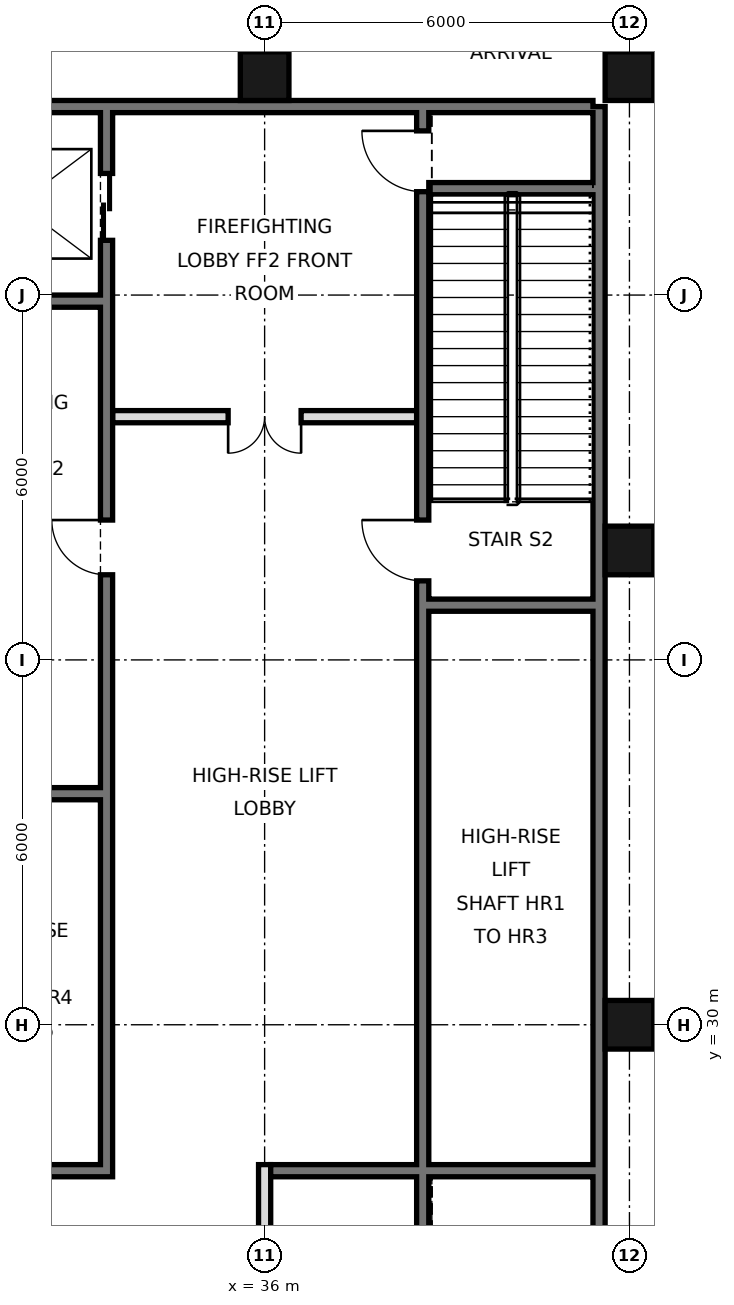
"""IFC4 building model, lengths in metres.
Left out: names, types, materials, properties, quantities, classifications, styles, units other than length and angle.
Written with IfcOpenShell. Run it as: python <this file> out.ifc"""

import sys

from ifc_helpers import new_model, si_unit, direction, frame, frame_2d, origin, origin_2d, place, context, subcontext, project, spatial, rectangle, hollow_rectangle, extrude, element, fill, save


model = new_model("IFC4")
c1 = context("Model", 3, precision=1e-05, world=origin(), true_north=direction((0.0, 1.0)))
c2 = subcontext(c1, "Body", "Model", "MODEL_VIEW")
j1 = project(units=[si_unit("LENGTHUNIT", "METRE"), si_unit("PLANEANGLEUNIT", "RADIAN")], contexts=[c1])
p1 = place(None, origin())
s1 = spatial("IfcSite", under=j1, at=p1, CompositionType="ELEMENT")
p2 = place(p1, origin())
s2 = spatial("IfcBuilding", under=s1, at=p2, CompositionType="ELEMENT")
p3 = place(p2, frame((0.0, 0.0, 331.2)))
s3 = spatial("IfcBuildingStorey", under=s2, at=p3, CompositionType="ELEMENT", Elevation=331.2)
for number, where, z_axis, x_axis in (
    (1, (36.0, 45.6, 0.0), (0.0, 0.0, 1.0), (1.0, 0.0, 0.0)),
    (2, (42.0, 30.0, 0.0), (0.0, 0.0, 1.0), (1.0, 0.0, 0.0)),
    (3, (42.0, 37.8, 0.0), (0.0, 0.0, 1.0), (1.0, 0.0, 0.0)),
    (4, (42.0, 45.6, 0.0), (0.0, 0.0, 1.0), (1.0, 0.0, 0.0)),
):
    element("IfcColumn", number, at=place(p3, frame(where, z_axis=z_axis, x_axis=x_axis)), inside=s3, PredefinedType="COLUMN", context=c2, shape_type="SweptSolid", body=[
        extrude(hollow_rectangle(XDim=0.8, YDim=0.8, WallThickness=0.025, at=origin_2d()), origin(), (0.0, 0.0, 1.0), 6.6),
    ])
p4 = place(p3, frame((41.5, 21.6, 0.0), z_axis=(0.0, 0.0, 1.0), x_axis=(0.0, 1.0, 0.0)))
e5 = element("IfcWall", 5, at=p4, inside=s3, PredefinedType="SOLIDWALL", context=c2, shape_type="SweptSolid", body=[
    extrude(rectangle(XDim=23.5, YDim=0.2, at=frame_2d((11.75, 0.0))), origin(), (0.0, 0.0, 1.0), 6.35),
])
p5 = place(p3, frame((6.6, 45.1, 0.0), z_axis=(0.0, 0.0, 1.0), x_axis=(1.0, 0.0, 0.0)))
e6 = element("IfcWall", 6, at=p5, inside=s3, PredefinedType="SOLIDWALL", context=c2, shape_type="SweptSolid", body=[
    extrude(rectangle(XDim=34.8, YDim=0.2, at=frame_2d((17.4, 0.0))), origin(), (0.0, 0.0, 1.0), 6.35),
])
p6 = place(p3, frame((33.4, 27.5, 0.0), z_axis=(0.0, 0.0, 1.0), x_axis=(0.0, 1.0, 0.0)))
e7 = element("IfcWall", 7, at=p6, inside=s3, PredefinedType="SOLIDWALL", context=c2, shape_type="SweptSolid", body=[
    extrude(rectangle(XDim=17.5, YDim=0.2, at=frame_2d((8.75, 0.0))), origin(), (0.0, 0.0, 1.0), 6.35),
])
p7 = place(p6, frame((15.4, 0.0, 0.0)))
e8 = element("IfcOpeningElement", 8, at=p7, cuts=e7, PredefinedType="OPENING", context=c2, shape_type="SweptSolid", body=[
    extrude(rectangle(XDim=1.1, YDim=2.1, at=frame_2d((0.55, 1.05))), frame((0.0, 0.11, 0.0), z_axis=(0.0, -1.0, 0.0), x_axis=(1.0, 0.0, 0.0)), (0.0, 0.0, 1.0), 0.22),
])
p8 = place(p6, frame((9.9, 0.0, 0.0)))
e9 = element("IfcOpeningElement", 9, at=p8, cuts=e7, PredefinedType="OPENING", context=c2, shape_type="SweptSolid", body=[
    extrude(rectangle(XDim=0.9, YDim=2.1, at=frame_2d((0.45, 1.05))), frame((0.0, 0.11, 0.0), z_axis=(0.0, -1.0, 0.0), x_axis=(1.0, 0.0, 0.0)), (0.0, 0.0, 1.0), 0.22),
])
p9 = place(p3, frame((36.0, 21.6, 0.0), z_axis=(0.0, 0.0, 1.0), x_axis=(0.0, 1.0, 0.0)))
e10 = element("IfcWall", 10, at=p9, inside=s3, PredefinedType="PARTITIONING", context=c2, shape_type="SweptSolid", body=[
    extrude(rectangle(XDim=6.1, YDim=0.2, at=frame_2d((3.05, 0.0))), origin(), (0.0, 0.0, 1.0), 6.35),
])
p10 = place(p3, frame((38.6, 21.6, 0.0), z_axis=(0.0, 0.0, 1.0), x_axis=(0.0, 1.0, 0.0)))
e11 = element("IfcWall", 11, at=p10, inside=s3, PredefinedType="SOLIDWALL", context=c2, shape_type="SweptSolid", body=[
    extrude(rectangle(XDim=23.4, YDim=0.2, at=frame_2d((11.7, 0.0))), origin(), (0.0, 0.0, 1.0), 6.35),
])
p11 = place(p10, frame((22.1, 0.0, 0.0)))
e12 = element("IfcOpeningElement", 12, at=p11, cuts=e11, PredefinedType="OPENING", context=c2, shape_type="SweptSolid", body=[
    extrude(rectangle(XDim=1.0, YDim=2.1, at=frame_2d((0.5, 1.05))), frame((0.0, 0.11, 0.0), z_axis=(0.0, -1.0, 0.0), x_axis=(1.0, 0.0, 0.0)), (0.0, 0.0, 1.0), 0.22),
])
p12 = place(p10, frame((15.7, 0.0, 0.0)))
e13 = element("IfcOpeningElement", 13, at=p12, cuts=e11, PredefinedType="OPENING", context=c2, shape_type="SweptSolid", body=[
    extrude(rectangle(XDim=1.0, YDim=2.1, at=frame_2d((0.5, 1.05))), frame((0.0, 0.11, 0.0), z_axis=(0.0, -1.0, 0.0), x_axis=(1.0, 0.0, 0.0)), (0.0, 0.0, 1.0), 0.22),
])
p13 = place(p10, frame((0.175, 0.0, 0.0)))
e14 = element("IfcOpeningElement", 14, at=p13, cuts=e11, PredefinedType="OPENING", context=c2, shape_type="SweptSolid", body=[
    extrude(rectangle(XDim=0.9, YDim=2.1, at=frame_2d((0.45, 1.05))), frame((0.0, 0.11, 0.0), z_axis=(0.0, -1.0, 0.0), x_axis=(1.0, 0.0, 0.0)), (0.0, 0.0, 1.0), 0.22),
])
p14 = place(p3, frame((30.6, 27.6, 0.0), z_axis=(0.0, 0.0, 1.0), x_axis=(1.0, 0.0, 0.0)))
e15 = element("IfcWall", 15, at=p14, inside=s3, PredefinedType="SOLIDWALL", context=c2, shape_type="SweptSolid", body=[
    extrude(rectangle(XDim=2.7, YDim=0.2, at=frame_2d((1.35, 0.0))), origin(), (0.0, 0.0, 1.0), 6.35),
])
p15 = place(p3, frame((36.1, 27.6, 0.0), z_axis=(0.0, 0.0, 1.0), x_axis=(1.0, 0.0, 0.0)))
e16 = element("IfcWall", 16, at=p15, inside=s3, PredefinedType="SOLIDWALL", context=c2, shape_type="SweptSolid", body=[
    extrude(rectangle(XDim=5.3, YDim=0.2, at=frame_2d((2.65, 0.0))), origin(), (0.0, 0.0, 1.0), 6.35),
])
for number, where, z_axis, x_axis in (
    (17, (30.6, 33.8, 0.0), (0.0, 0.0, 1.0), (1.0, 0.0, 0.0)),
    (18, (38.7, 36.9, 0.0), (0.0, 0.0, 1.0), (1.0, 0.0, 0.0)),
):
    element("IfcWall", number, at=place(p3, frame(where, z_axis=z_axis, x_axis=x_axis)), inside=s3, PredefinedType="SOLIDWALL", context=c2, shape_type="SweptSolid", body=[
        extrude(rectangle(XDim=2.7, YDim=0.2, at=frame_2d((1.35, 0.0))), origin(), (0.0, 0.0, 1.0), 6.35),
    ])
p16 = place(p3, frame((33.5, 40.0, 0.0), z_axis=(0.0, 0.0, 1.0), x_axis=(1.0, 0.0, 0.0)))
e19 = element("IfcWall", 19, at=p16, inside=s3, PredefinedType="PARTITIONING", context=c2, shape_type="SweptSolid", body=[
    extrude(rectangle(XDim=5.0, YDim=0.2, at=frame_2d((2.5, 0.0))), origin(), (0.0, 0.0, 1.0), 6.35),
])
p17 = place(p16, frame((1.9, 0.0, 0.0)))
e20 = element("IfcOpeningElement", 20, at=p17, cuts=e19, PredefinedType="OPENING", context=c2, shape_type="SweptSolid", body=[
    extrude(rectangle(XDim=1.2, YDim=2.1, at=frame_2d((0.6, 1.05))), frame((0.0, 0.11, 0.0), z_axis=(0.0, -1.0, 0.0), x_axis=(1.0, 0.0, 0.0)), (0.0, 0.0, 1.0), 0.22),
])
p18 = place(p3, frame((30.6, 41.9, 0.0), z_axis=(0.0, 0.0, 1.0), x_axis=(1.0, 0.0, 0.0)))
e21 = element("IfcWall", 21, at=p18, inside=s3, PredefinedType="SOLIDWALL", context=c2, shape_type="SweptSolid", body=[
    extrude(rectangle(XDim=2.7, YDim=0.2, at=frame_2d((1.35, 0.0))), origin(), (0.0, 0.0, 1.0), 6.35),
])
p19 = place(p3, frame((38.7, 43.75, 0.0), z_axis=(0.0, 0.0, 1.0), x_axis=(1.0, 0.0, 0.0)))
e22 = element("IfcWall", 22, at=p19, inside=s3, PredefinedType="SOLIDWALL", context=c2, shape_type="SweptSolid", body=[
    extrude(rectangle(XDim=2.7, YDim=0.2, at=frame_2d((1.35, 0.0))), origin(), (0.0, 0.0, 1.0), 3.1),
])
p20 = place(p17, frame((1.2, 0.0, 0.0), z_axis=(0.0, 0.0, 1.0), x_axis=(-1.0, 0.0, 0.0)))
e23 = element("IfcDoor", 23, at=p20, inside=s3, OperationType="DOUBLE_DOOR_SINGLE_SWING", PredefinedType="DOOR", context=c2, shape_type="SweptSolid", body=[
    extrude(rectangle(XDim=1.2, YDim=2.1, at=frame_2d((0.6, 1.05))), frame((0.0, 0.025, 0.0), z_axis=(0.0, -1.0, 0.0), x_axis=(1.0, 0.0, 0.0)), (0.0, 0.0, 1.0), 0.05),
])
fill(e20, e23)
p21 = place(p7, origin())
e24 = element("IfcDoor", 24, at=p21, inside=s3, OperationType="DOUBLE_DOOR_SLIDING", PredefinedType="DOOR", context=c2, shape_type="SweptSolid", body=[
    extrude(rectangle(XDim=1.1, YDim=2.1, at=frame_2d((0.55, 1.05))), frame((0.0, 0.025, 0.0), z_axis=(0.0, -1.0, 0.0), x_axis=(1.0, 0.0, 0.0)), (0.0, 0.0, 1.0), 0.05),
])
fill(e8, e24)
p22 = place(p11, frame((1.0, 0.0, 0.0), z_axis=(0.0, 0.0, 1.0), x_axis=(-1.0, 0.0, 0.0)))
e25 = element("IfcDoor", 25, at=p22, inside=s3, OperationType="SINGLE_SWING_LEFT", PredefinedType="DOOR", context=c2, shape_type="SweptSolid", body=[
    extrude(rectangle(XDim=1.0, YDim=2.1, at=frame_2d((0.5, 1.05))), frame((0.0, 0.025, 0.0), z_axis=(0.0, -1.0, 0.0), x_axis=(1.0, 0.0, 0.0)), (0.0, 0.0, 1.0), 0.05),
])
fill(e12, e25)
p23 = place(p12, frame((1.0, 0.0, 0.0), z_axis=(0.0, 0.0, 1.0), x_axis=(-1.0, 0.0, 0.0)))
e26 = element("IfcDoor", 26, at=p23, inside=s3, OperationType="SINGLE_SWING_LEFT", PredefinedType="DOOR", context=c2, shape_type="SweptSolid", body=[
    extrude(rectangle(XDim=1.0, YDim=2.1, at=frame_2d((0.5, 1.05))), frame((0.0, 0.025, 0.0), z_axis=(0.0, -1.0, 0.0), x_axis=(1.0, 0.0, 0.0)), (0.0, 0.0, 1.0), 0.05),
])
fill(e13, e26)
p24 = place(p8, frame((0.9, 0.0, 0.0), z_axis=(0.0, 0.0, 1.0), x_axis=(-1.0, 0.0, 0.0)))
e27 = element("IfcDoor", 27, at=p24, inside=s3, OperationType="SINGLE_SWING_LEFT", PredefinedType="DOOR", context=c2, shape_type="SweptSolid", body=[
    extrude(rectangle(XDim=0.9, YDim=2.1, at=frame_2d((0.45, 1.05))), frame((0.0, 0.025, 0.0), z_axis=(0.0, -1.0, 0.0), x_axis=(1.0, 0.0, 0.0)), (0.0, 0.0, 1.0), 0.05),
])
fill(e9, e27)
save(model, sys.argv[1])
